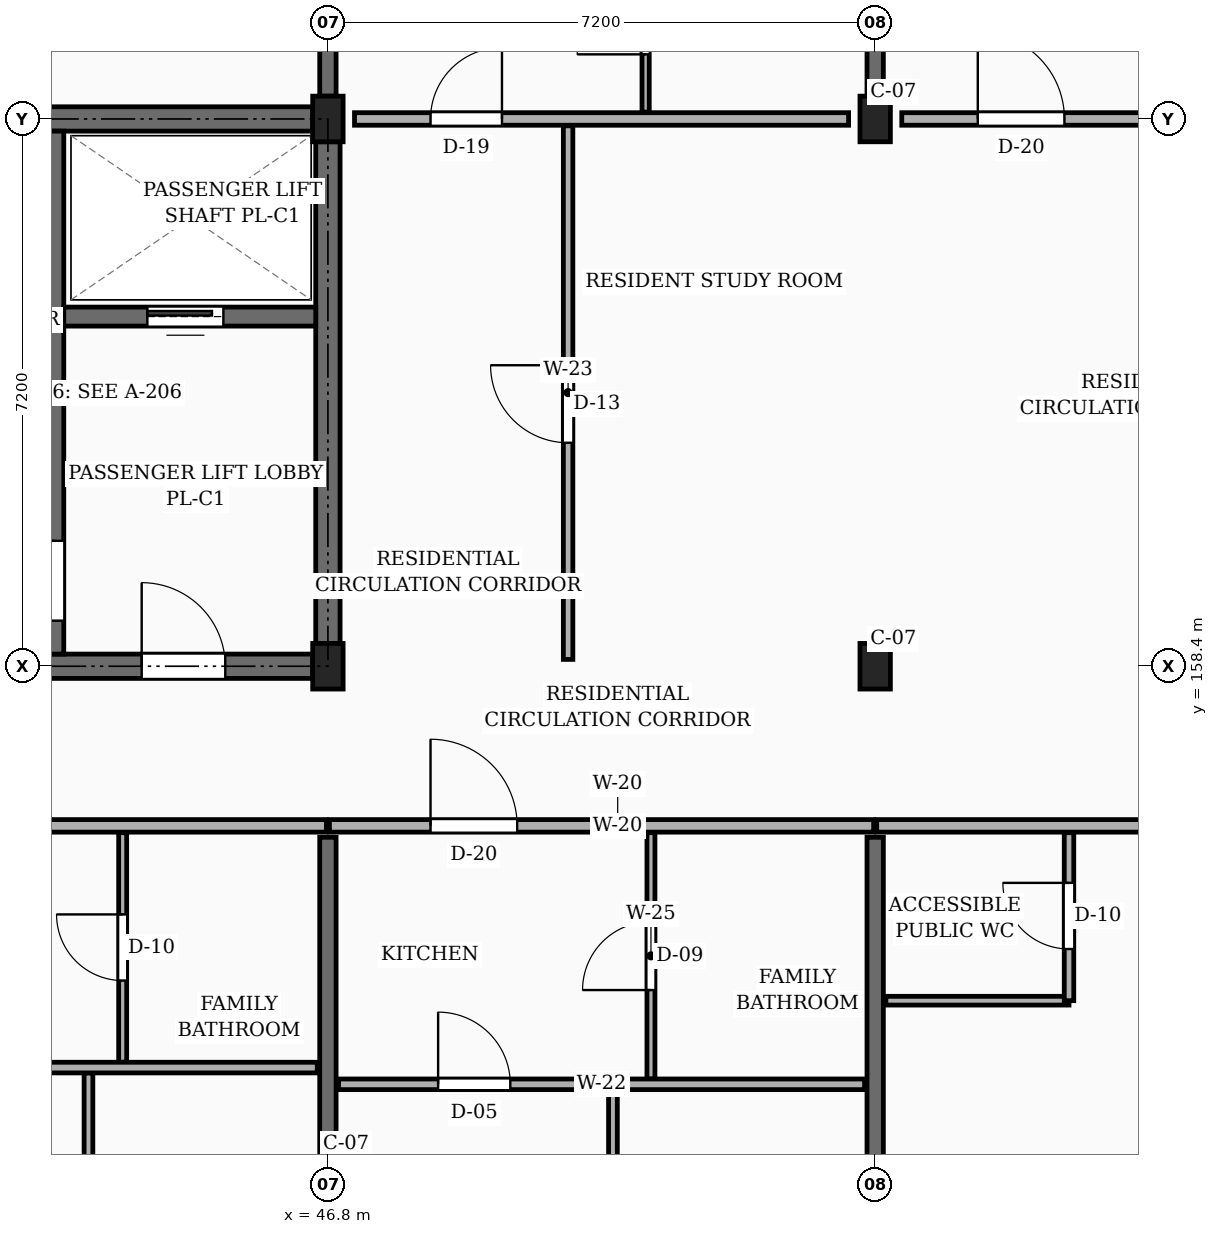
"""IFC4 building model, lengths in metres.
Left out: names, types, materials, properties, quantities, classifications, styles, units other than length and angle.
Written with IfcOpenShell. Run it as: python <this file> out.ifc"""

import sys

from ifc_helpers import new_model, si_unit, direction, frame, frame_2d, origin, origin_2d, place, context, subcontext, project, spatial, rectangle, extrude, element, fill, save


model = new_model("IFC4")
c1 = context("Model", 3, precision=1e-05, world=origin(), true_north=direction((0.0, 1.0)))
c2 = subcontext(c1, "Body", "Model", "MODEL_VIEW")
j1 = project(units=[si_unit("LENGTHUNIT", "METRE"), si_unit("PLANEANGLEUNIT", "RADIAN")], contexts=[c1])
p1 = place(None, origin())
s1 = spatial("IfcSite", under=j1, at=p1, CompositionType="ELEMENT")
p2 = place(p1, origin())
s2 = spatial("IfcBuilding", under=s1, at=p2, CompositionType="ELEMENT")
p3 = place(p2, frame((0.0, 0.0, 26.55)))
s3 = spatial("IfcBuildingStorey", under=s2, at=p3, CompositionType="ELEMENT", Elevation=26.55)
for number, where, z_axis, x_axis in (
    (1, (46.8, 158.4, 0.0), (0.0, 0.0, 1.0), (1.0, 0.0, 0.0)),
    (2, (46.8, 165.6, 0.0), (0.0, 0.0, 1.0), (1.0, 0.0, 0.0)),
    (3, (54.0, 158.4, 0.0), (0.0, 0.0, 1.0), (1.0, 0.0, 0.0)),
    (4, (54.0, 165.6, 0.0), (0.0, 0.0, 1.0), (1.0, 0.0, 0.0)),
):
    element("IfcColumn", number, at=place(p3, frame(where, z_axis=z_axis, x_axis=x_axis)), inside=s3, PredefinedType="COLUMN", context=c2, shape_type="SweptSolid", body=[
        extrude(rectangle(XDim=0.4, YDim=0.6, at=origin_2d()), origin(), (0.0, 0.0, 1.0), 3.15),
    ])
p4 = place(p3, frame((46.8, 144.25, 0.0), z_axis=(0.0, 0.0, 1.0), x_axis=(0.0, 1.0, 0.0)))
e5 = element("IfcWall", 5, at=p4, inside=s3, PredefinedType="SOLIDWALL", context=c2, shape_type="SweptSolid", body=[
    extrude(rectangle(XDim=11.9, YDim=0.215, at=frame_2d((5.95, 0.0))), origin(), (0.0, 0.0, 1.0), 2.185),
])
p5 = place(p3, frame((46.8, 165.9, 0.0), z_axis=(0.0, 0.0, 1.0), x_axis=(0.0, 1.0, 0.0)))
e6 = element("IfcWall", 6, at=p5, inside=s3, PredefinedType="SOLIDWALL", context=c2, shape_type="SweptSolid", body=[
    extrude(rectangle(XDim=6.65, YDim=0.215, at=frame_2d((3.325, 0.0))), origin(), (0.0, 0.0, 1.0), 2.185),
])
p6 = place(p3, frame((54.0, 144.25, 0.0), z_axis=(0.0, 0.0, 1.0), x_axis=(0.0, 1.0, 0.0)))
e7 = element("IfcWall", 7, at=p6, inside=s3, PredefinedType="SOLIDWALL", context=c2, shape_type="SweptSolid", body=[
    extrude(rectangle(XDim=11.9, YDim=0.215, at=frame_2d((5.95, 0.0))), origin(), (0.0, 0.0, 1.0), 2.185),
])
p7 = place(p3, frame((54.0, 165.9, 0.0), z_axis=(0.0, 0.0, 1.0), x_axis=(0.0, 1.0, 0.0)))
e8 = element("IfcWall", 8, at=p7, inside=s3, PredefinedType="SOLIDWALL", context=c2, shape_type="SweptSolid", body=[
    extrude(rectangle(XDim=6.65, YDim=0.215, at=frame_2d((3.325, 0.0))), origin(), (0.0, 0.0, 1.0), 2.185),
])
p8 = place(p3, frame((39.8, 165.6, 0.0), z_axis=(0.0, 0.0, 1.0), x_axis=(1.0, 0.0, 0.0)))
e9 = element("IfcWall", 9, at=p8, inside=s3, PredefinedType="SHEAR", context=c2, shape_type="SweptSolid", body=[
    extrude(rectangle(XDim=6.8, YDim=0.32, at=frame_2d((3.4, 0.0))), origin(), (0.0, 0.0, 1.0), 2.885),
])
p9 = place(p3, frame((46.8, 158.7, 0.0), z_axis=(0.0, 0.0, 1.0), x_axis=(0.0, 1.0, 0.0)))
e10 = element("IfcWall", 10, at=p9, inside=s3, PredefinedType="SHEAR", context=c2, shape_type="SweptSolid", body=[
    extrude(rectangle(XDim=6.6, YDim=0.32, at=frame_2d((3.3, 0.0))), origin(), (0.0, 0.0, 1.0), 2.885),
])
p10 = place(p3, frame((39.8, 158.4, 0.0), z_axis=(0.0, 0.0, 1.0), x_axis=(1.0, 0.0, 0.0)))
e11 = element("IfcWall", 11, at=p10, inside=s3, PredefinedType="SHEAR", context=c2, shape_type="SweptSolid", body=[
    extrude(rectangle(XDim=6.8, YDim=0.32, at=frame_2d((3.4, 0.0))), origin(), (0.0, 0.0, 1.0), 2.885),
])
p11 = place(p10, frame((4.55, 0.0, 0.0)))
e12 = element("IfcOpeningElement", 12, at=p11, cuts=e11, PredefinedType="OPENING", context=c2, shape_type="SweptSolid", body=[
    extrude(rectangle(XDim=1.1, YDim=2.15, at=frame_2d((0.55, 1.075))), frame((0.0, 0.17, 0.0), z_axis=(0.0, -1.0, 0.0), x_axis=(1.0, 0.0, 0.0)), (0.0, 0.0, 1.0), 0.34),
])
p12 = place(p3, frame((43.2, 158.56, 0.0), z_axis=(0.0, 0.0, 1.0), x_axis=(0.0, 1.0, 0.0)))
e13 = element("IfcWall", 13, at=p12, inside=s3, PredefinedType="SHEAR", context=c2, shape_type="SweptSolid", body=[
    extrude(rectangle(XDim=6.88, YDim=0.25, at=frame_2d((3.44, 0.0))), origin(), (0.0, 0.0, 1.0), 2.885),
])
p13 = place(p12, frame((0.44, 0.0, 0.0)))
e14 = element("IfcOpeningElement", 14, at=p13, cuts=e13, PredefinedType="OPENING", context=c2, shape_type="SweptSolid", body=[
    extrude(rectangle(XDim=1.05, YDim=2.15, at=frame_2d((0.525, 1.075))), frame((0.0, 0.135, 0.0), z_axis=(0.0, -1.0, 0.0), x_axis=(1.0, 0.0, 0.0)), (0.0, 0.0, 1.0), 0.27),
])
p14 = place(p3, frame((43.325, 163.0, 0.0), z_axis=(0.0, 0.0, 1.0), x_axis=(1.0, 0.0, 0.0)))
e15 = element("IfcWall", 15, at=p14, inside=s3, PredefinedType="SHEAR", context=c2, shape_type="SweptSolid", body=[
    extrude(rectangle(XDim=3.315, YDim=0.25, at=frame_2d((1.657, 0.0))), origin(), (0.0, 0.0, 1.0), 2.885),
])
p15 = place(p14, frame((1.1, 0.0, 0.0)))
e16 = element("IfcOpeningElement", 16, at=p15, cuts=e15, PredefinedType="OPENING", context=c2, shape_type="SweptSolid", body=[
    extrude(rectangle(XDim=1.0, YDim=2.2, at=frame_2d((0.5, 1.1))), frame((0.0, 0.135, 0.0), z_axis=(0.0, -1.0, 0.0), x_axis=(1.0, 0.0, 0.0)), (0.0, 0.0, 1.0), 0.27),
])
p16 = place(p3, frame((39.62, 156.3, 0.0), z_axis=(0.0, 0.0, 1.0), x_axis=(1.0, 0.0, 0.0)))
e17 = element("IfcWall", 17, at=p16, inside=s3, PredefinedType="PARTITIONING", context=c2, shape_type="SweptSolid", body=[
    extrude(rectangle(XDim=7.16, YDim=0.165, at=frame_2d((3.58, 0.0))), origin(), (0.0, 0.0, 1.0), 2.32),
])
p17 = place(p16, frame((1.33, 0.0, 0.0)))
e18 = element("IfcOpeningElement", 18, at=p17, cuts=e17, PredefinedType="OPENING", context=c2, shape_type="SweptSolid", body=[
    extrude(rectangle(XDim=0.94, YDim=2.12, at=frame_2d((0.47, 1.06))), frame((0.0, 0.093, 0.0), z_axis=(0.0, -1.0, 0.0), x_axis=(1.0, 0.0, 0.0)), (0.0, 0.0, 1.0), 0.185),
])
p18 = place(p3, frame((46.82, 156.3, 0.0), z_axis=(0.0, 0.0, 1.0), x_axis=(1.0, 0.0, 0.0)))
e19 = element("IfcWall", 19, at=p18, inside=s3, PredefinedType="PARTITIONING", context=c2, shape_type="SweptSolid", body=[
    extrude(rectangle(XDim=7.16, YDim=0.165, at=frame_2d((3.58, 0.0))), origin(), (0.0, 0.0, 1.0), 2.32),
])
p19 = place(p18, frame((1.33, 0.0, 0.0)))
e20 = element("IfcOpeningElement", 20, at=p19, cuts=e19, PredefinedType="OPENING", context=c2, shape_type="SweptSolid", body=[
    extrude(rectangle(XDim=1.14, YDim=2.18, at=frame_2d((0.57, 1.09))), frame((0.0, 0.093, 0.0), z_axis=(0.0, -1.0, 0.0), x_axis=(1.0, 0.0, 0.0)), (0.0, 0.0, 1.0), 0.185),
])
p20 = place(p3, frame((54.02, 156.3, 0.0), z_axis=(0.0, 0.0, 1.0), x_axis=(1.0, 0.0, 0.0)))
e21 = element("IfcWall", 21, at=p20, inside=s3, PredefinedType="PARTITIONING", context=c2, shape_type="SweptSolid", body=[
    extrude(rectangle(XDim=7.005, YDim=0.165, at=frame_2d((3.502, 0.0))), origin(), (0.0, 0.0, 1.0), 2.32),
])
p21 = place(p20, frame((4.33, 0.0, 0.0)))
e22 = element("IfcOpeningElement", 22, at=p21, cuts=e21, PredefinedType="OPENING", context=c2, shape_type="SweptSolid", body=[
    extrude(rectangle(XDim=1.1, YDim=2.15, at=frame_2d((0.55, 1.075))), frame((0.0, 0.093, 0.0), z_axis=(0.0, -1.0, 0.0), x_axis=(1.0, 0.0, 0.0)), (0.0, 0.0, 1.0), 0.185),
])
p22 = place(p3, frame((47.15, 165.6, 0.0), z_axis=(0.0, 0.0, 1.0), x_axis=(1.0, 0.0, 0.0)))
e23 = element("IfcWall", 23, at=p22, inside=s3, PredefinedType="PARTITIONING", context=c2, shape_type="SweptSolid", body=[
    extrude(rectangle(XDim=6.5, YDim=0.165, at=frame_2d((3.25, 0.0))), origin(), (0.0, 0.0, 1.0), 2.32),
])
p23 = place(p22, frame((1.0, 0.0, 0.0)))
e24 = element("IfcOpeningElement", 24, at=p23, cuts=e23, PredefinedType="OPENING", context=c2, shape_type="SweptSolid", body=[
    extrude(rectangle(XDim=0.94, YDim=2.12, at=frame_2d((0.47, 1.06))), frame((0.0, 0.093, 0.0), z_axis=(0.0, -1.0, 0.0), x_axis=(1.0, 0.0, 0.0)), (0.0, 0.0, 1.0), 0.185),
])
p24 = place(p3, frame((54.35, 165.6, 0.0), z_axis=(0.0, 0.0, 1.0), x_axis=(1.0, 0.0, 0.0)))
e25 = element("IfcWall", 25, at=p24, inside=s3, PredefinedType="PARTITIONING", context=c2, shape_type="SweptSolid", body=[
    extrude(rectangle(XDim=6.5, YDim=0.165, at=frame_2d((3.25, 0.0))), origin(), (0.0, 0.0, 1.0), 2.32),
])
p25 = place(p24, frame((1.0, 0.0, 0.0)))
e26 = element("IfcOpeningElement", 26, at=p25, cuts=e25, PredefinedType="OPENING", context=c2, shape_type="SweptSolid", body=[
    extrude(rectangle(XDim=1.14, YDim=2.18, at=frame_2d((0.57, 1.09))), frame((0.0, 0.093, 0.0), z_axis=(0.0, -1.0, 0.0), x_axis=(1.0, 0.0, 0.0)), (0.0, 0.0, 1.0), 0.185),
])
p26 = place(p3, frame((43.65, 144.175, 0.0), z_axis=(0.0, 0.0, 1.0), x_axis=(0.0, 1.0, 0.0)))
e27 = element("IfcWall", 27, at=p26, inside=s3, PredefinedType="PARTITIONING", context=c2, shape_type="SweptSolid", body=[
    extrude(rectangle(XDim=8.875, YDim=0.115, at=frame_2d((4.438, 0.0))), origin(), (0.0, 0.0, 1.0), 2.32),
])
p27 = place(p26, frame((3.998, 0.0, 0.0)))
e28 = element("IfcOpeningElement", 28, at=p27, cuts=e27, PredefinedType="OPENING", context=c2, shape_type="SweptSolid", body=[
    extrude(rectangle(XDim=0.88, YDim=2.08, at=frame_2d((0.44, 1.04))), frame((0.0, 0.067, 0.0), z_axis=(0.0, -1.0, 0.0), x_axis=(1.0, 0.0, 0.0)), (0.0, 0.0, 1.0), 0.135),
])
p28 = place(p3, frame((44.1, 153.19, 0.0), z_axis=(0.0, 0.0, 1.0), x_axis=(0.0, 1.0, 0.0)))
e29 = element("IfcWall", 29, at=p28, inside=s3, PredefinedType="PARTITIONING", context=c2, shape_type="SweptSolid", body=[
    extrude(rectangle(XDim=3.02, YDim=0.105, at=frame_2d((1.51, 0.0))), origin(), (0.0, 0.0, 1.0), 2.32),
])
p29 = place(p28, frame((1.075, 0.0, 0.0)))
e30 = element("IfcOpeningElement", 30, at=p29, cuts=e29, PredefinedType="OPENING", context=c2, shape_type="SweptSolid", body=[
    extrude(rectangle(XDim=0.87, YDim=2.05, at=frame_2d((0.435, 1.025))), frame((0.0, 0.062, 0.0), z_axis=(0.0, -1.0, 0.0), x_axis=(1.0, 0.0, 0.0)), (0.0, 0.0, 1.0), 0.125),
])
p30 = place(p3, frame((39.74, 153.12, 0.0), z_axis=(0.0, 0.0, 1.0), x_axis=(1.0, 0.0, 0.0)))
e31 = element("IfcWall", 31, at=p30, inside=s3, PredefinedType="PARTITIONING", context=c2, shape_type="SweptSolid", body=[
    extrude(rectangle(XDim=6.92, YDim=0.14, at=frame_2d((3.46, 0.0))), origin(), (0.0, 0.0, 1.0), 2.32),
])
p31 = place(p30, frame((1.31, 0.0, 0.0)))
e32 = element("IfcOpeningElement", 32, at=p31, cuts=e31, PredefinedType="OPENING", context=c2, shape_type="SweptSolid", body=[
    extrude(rectangle(XDim=0.92, YDim=2.1, at=frame_2d((0.46, 1.05))), frame((0.0, 0.08, 0.0), z_axis=(0.0, -1.0, 0.0), x_axis=(1.0, 0.0, 0.0)), (0.0, 0.0, 1.0), 0.16),
])
p32 = place(p3, frame((49.96, 158.49, 0.0), z_axis=(0.0, 0.0, 1.0), x_axis=(0.0, 1.0, 0.0)))
e33 = element("IfcWall", 33, at=p32, inside=s3, PredefinedType="PARTITIONING", context=c2, shape_type="SweptSolid", body=[
    extrude(rectangle(XDim=7.02, YDim=0.125, at=frame_2d((3.51, 0.0))), origin(), (0.0, 0.0, 1.0), 2.32),
])
p33 = place(p32, frame((2.85, 0.0, 0.0)))
e34 = element("IfcOpeningElement", 34, at=p33, cuts=e33, PredefinedType="OPENING", context=c2, shape_type="SweptSolid", body=[
    extrude(rectangle(XDim=1.02, YDim=2.15, at=frame_2d((0.51, 1.075))), frame((0.0, 0.073, 0.0), z_axis=(0.0, -1.0, 0.0), x_axis=(1.0, 0.0, 0.0)), (0.0, 0.0, 1.0), 0.145),
])
p34 = place(p3, frame((50.55, 144.175, 0.0), z_axis=(0.0, 0.0, 1.0), x_axis=(0.0, 1.0, 0.0)))
e35 = element("IfcWall", 35, at=p34, inside=s3, PredefinedType="PARTITIONING", context=c2, shape_type="SweptSolid", body=[
    extrude(rectangle(XDim=8.655, YDim=0.115, at=frame_2d((4.328, 0.0))), origin(), (0.0, 0.0, 1.0), 2.32),
])
p35 = place(p34, frame((3.877, 0.0, 0.0)))
e36 = element("IfcOpeningElement", 36, at=p35, cuts=e35, PredefinedType="OPENING", context=c2, shape_type="SweptSolid", body=[
    extrude(rectangle(XDim=0.9, YDim=2.1, at=frame_2d((0.45, 1.05))), frame((0.0, 0.067, 0.0), z_axis=(0.0, -1.0, 0.0), x_axis=(1.0, 0.0, 0.0)), (0.0, 0.0, 1.0), 0.135),
])
p36 = place(p3, frame((51.05, 152.97, 0.0), z_axis=(0.0, 0.0, 1.0), x_axis=(0.0, 1.0, 0.0)))
e37 = element("IfcWall", 37, at=p36, inside=s3, PredefinedType="PARTITIONING", context=c2, shape_type="SweptSolid", body=[
    extrude(rectangle(XDim=3.24, YDim=0.105, at=frame_2d((1.62, 0.0))), origin(), (0.0, 0.0, 1.0), 2.32),
])
p37 = place(p36, frame((1.17, 0.0, 0.0)))
e38 = element("IfcOpeningElement", 38, at=p37, cuts=e37, PredefinedType="OPENING", context=c2, shape_type="SweptSolid", body=[
    extrude(rectangle(XDim=0.9, YDim=2.05, at=frame_2d((0.45, 1.025))), frame((0.0, 0.062, 0.0), z_axis=(0.0, -1.0, 0.0), x_axis=(1.0, 0.0, 0.0)), (0.0, 0.0, 1.0), 0.125),
])
p38 = place(p3, frame((46.94, 152.9, 0.0), z_axis=(0.0, 0.0, 1.0), x_axis=(1.0, 0.0, 0.0)))
e39 = element("IfcWall", 39, at=p38, inside=s3, PredefinedType="PARTITIONING", context=c2, shape_type="SweptSolid", body=[
    extrude(rectangle(XDim=6.92, YDim=0.14, at=frame_2d((3.46, 0.0))), origin(), (0.0, 0.0, 1.0), 2.32),
])
p39 = place(p38, frame((1.31, 0.0, 0.0)))
e40 = element("IfcOpeningElement", 40, at=p39, cuts=e39, PredefinedType="OPENING", context=c2, shape_type="SweptSolid", body=[
    extrude(rectangle(XDim=0.95, YDim=2.1, at=frame_2d((0.475, 1.05))), frame((0.0, 0.08, 0.0), z_axis=(0.0, -1.0, 0.0), x_axis=(1.0, 0.0, 0.0)), (0.0, 0.0, 1.0), 0.16),
])
p40 = place(p3, frame((50.98, 165.69, 0.0), z_axis=(0.0, 0.0, 1.0), x_axis=(0.0, 1.0, 0.0)))
e41 = element("IfcWall", 41, at=p40, inside=s3, PredefinedType="PARTITIONING", context=c2, shape_type="SweptSolid", body=[
    extrude(rectangle(XDim=2.42, YDim=0.095, at=frame_2d((1.21, 0.0))), origin(), (0.0, 0.0, 1.0), 2.32),
])
p41 = place(p40, frame((0.76, 0.0, 0.0)))
e42 = element("IfcOpeningElement", 42, at=p41, cuts=e41, PredefinedType="OPENING", context=c2, shape_type="SweptSolid", body=[
    extrude(rectangle(XDim=0.9, YDim=2.05, at=frame_2d((0.45, 1.025))), frame((0.0, 0.058, 0.0), z_axis=(0.0, -1.0, 0.0), x_axis=(1.0, 0.0, 0.0)), (0.0, 0.0, 1.0), 0.115),
])
p42 = place(p3, frame((54.14, 154.0, 0.0), z_axis=(0.0, 0.0, 1.0), x_axis=(1.0, 0.0, 0.0)))
e43 = element("IfcWall", 43, at=p42, inside=s3, PredefinedType="PARTITIONING", context=c2, shape_type="SweptSolid", body=[
    extrude(rectangle(XDim=2.41, YDim=0.115, at=frame_2d((1.205, 0.0))), origin(), (0.0, 0.0, 1.0), 2.32),
])
p43 = place(p3, frame((56.55, 154.0, 0.0), z_axis=(0.0, 0.0, 1.0), x_axis=(0.0, 1.0, 0.0)))
e44 = element("IfcWall", 44, at=p43, inside=s3, PredefinedType="PARTITIONING", context=c2, shape_type="SweptSolid", body=[
    extrude(rectangle(XDim=2.21, YDim=0.125, at=frame_2d((1.105, 0.0))), origin(), (0.0, 0.0, 1.0), 2.32),
])
p44 = place(p43, frame((0.68, 0.0, 0.0)))
e45 = element("IfcOpeningElement", 45, at=p44, cuts=e44, PredefinedType="OPENING", context=c2, shape_type="SweptSolid", body=[
    extrude(rectangle(XDim=0.87, YDim=2.05, at=frame_2d((0.435, 1.025))), frame((0.0, 0.073, 0.0), z_axis=(0.0, -1.0, 0.0), x_axis=(1.0, 0.0, 0.0)), (0.0, 0.0, 1.0), 0.145),
])
p45 = place(p11, frame((1.1, 0.0, 0.0), z_axis=(0.0, 0.0, 1.0), x_axis=(-1.0, 0.0, 0.0)))
e46 = element("IfcDoor", 46, at=p45, inside=s3, OperationType="SINGLE_SWING_LEFT", PredefinedType="DOOR", context=c2, shape_type="SweptSolid", body=[
    extrude(rectangle(XDim=1.1, YDim=2.15, at=frame_2d((0.55, 1.075))), frame((0.0, 0.025, 0.0), z_axis=(0.0, -1.0, 0.0), x_axis=(1.0, 0.0, 0.0)), (0.0, 0.0, 1.0), 0.05),
])
fill(e12, e46)
p46 = place(p13, origin())
e47 = element("IfcDoor", 47, at=p46, inside=s3, OperationType="SINGLE_SWING_RIGHT", PredefinedType="DOOR", context=c2, shape_type="SweptSolid", body=[
    extrude(rectangle(XDim=1.05, YDim=2.15, at=frame_2d((0.525, 1.075))), frame((0.0, 0.025, 0.0), z_axis=(0.0, -1.0, 0.0), x_axis=(1.0, 0.0, 0.0)), (0.0, 0.0, 1.0), 0.05),
])
fill(e14, e47)
p47 = place(p15, origin())
e48 = element("IfcDoor", 48, at=p47, inside=s3, OperationType="SLIDING_TO_LEFT", PredefinedType="DOOR", context=c2, shape_type="SweptSolid", body=[
    extrude(rectangle(XDim=1.0, YDim=2.2, at=frame_2d((0.5, 1.1))), frame((0.0, 0.025, 0.0), z_axis=(0.0, -1.0, 0.0), x_axis=(1.0, 0.0, 0.0)), (0.0, 0.0, 1.0), 0.05),
])
fill(e16, e48)
p48 = place(p19, origin())
e49 = element("IfcDoor", 49, at=p48, inside=s3, OperationType="SINGLE_SWING_LEFT", PredefinedType="DOOR", context=c2, shape_type="SweptSolid", body=[
    extrude(rectangle(XDim=1.14, YDim=2.18, at=frame_2d((0.57, 1.09))), frame((0.0, 0.025, 0.0), z_axis=(0.0, -1.0, 0.0), x_axis=(1.0, 0.0, 0.0)), (0.0, 0.0, 1.0), 0.05),
])
fill(e20, e49)
p49 = place(p23, origin())
e50 = element("IfcDoor", 50, at=p49, inside=s3, OperationType="SINGLE_SWING_RIGHT", PredefinedType="DOOR", context=c2, shape_type="SweptSolid", body=[
    extrude(rectangle(XDim=0.94, YDim=2.12, at=frame_2d((0.47, 1.06))), frame((0.0, 0.025, 0.0), z_axis=(0.0, -1.0, 0.0), x_axis=(1.0, 0.0, 0.0)), (0.0, 0.0, 1.0), 0.05),
])
fill(e24, e50)
p50 = place(p25, origin())
e51 = element("IfcDoor", 51, at=p50, inside=s3, OperationType="SINGLE_SWING_LEFT", PredefinedType="DOOR", context=c2, shape_type="SweptSolid", body=[
    extrude(rectangle(XDim=1.14, YDim=2.18, at=frame_2d((0.57, 1.09))), frame((0.0, 0.025, 0.0), z_axis=(0.0, -1.0, 0.0), x_axis=(1.0, 0.0, 0.0)), (0.0, 0.0, 1.0), 0.05),
])
fill(e26, e51)
p51 = place(p29, origin())
e52 = element("IfcDoor", 52, at=p51, inside=s3, OperationType="SINGLE_SWING_RIGHT", PredefinedType="DOOR", context=c2, shape_type="SweptSolid", body=[
    extrude(rectangle(XDim=0.87, YDim=2.05, at=frame_2d((0.435, 1.025))), frame((0.0, 0.025, 0.0), z_axis=(0.0, -1.0, 0.0), x_axis=(1.0, 0.0, 0.0)), (0.0, 0.0, 1.0), 0.05),
])
fill(e30, e52)
p52 = place(p33, origin())
e53 = element("IfcDoor", 53, at=p52, inside=s3, OperationType="SINGLE_SWING_RIGHT", PredefinedType="DOOR", context=c2, shape_type="SweptSolid", body=[
    extrude(rectangle(XDim=1.02, YDim=2.15, at=frame_2d((0.51, 1.075))), frame((0.0, 0.025, 0.0), z_axis=(0.0, -1.0, 0.0), x_axis=(1.0, 0.0, 0.0)), (0.0, 0.0, 1.0), 0.05),
])
fill(e34, e53)
p53 = place(p37, origin())
e54 = element("IfcDoor", 54, at=p53, inside=s3, OperationType="SINGLE_SWING_LEFT", PredefinedType="DOOR", context=c2, shape_type="SweptSolid", body=[
    extrude(rectangle(XDim=0.9, YDim=2.05, at=frame_2d((0.45, 1.025))), frame((0.0, 0.025, 0.0), z_axis=(0.0, -1.0, 0.0), x_axis=(1.0, 0.0, 0.0)), (0.0, 0.0, 1.0), 0.05),
])
fill(e38, e54)
p54 = place(p39, origin())
e55 = element("IfcDoor", 55, at=p54, inside=s3, OperationType="SINGLE_SWING_LEFT", PredefinedType="DOOR", context=c2, shape_type="SweptSolid", body=[
    extrude(rectangle(XDim=0.95, YDim=2.1, at=frame_2d((0.475, 1.05))), frame((0.0, 0.025, 0.0), z_axis=(0.0, -1.0, 0.0), x_axis=(1.0, 0.0, 0.0)), (0.0, 0.0, 1.0), 0.05),
])
fill(e40, e55)
p55 = place(p41, origin())
e56 = element("IfcDoor", 56, at=p55, inside=s3, OperationType="SINGLE_SWING_LEFT", PredefinedType="DOOR", context=c2, shape_type="SweptSolid", body=[
    extrude(rectangle(XDim=0.9, YDim=2.05, at=frame_2d((0.45, 1.025))), frame((0.0, 0.025, 0.0), z_axis=(0.0, -1.0, 0.0), x_axis=(1.0, 0.0, 0.0)), (0.0, 0.0, 1.0), 0.05),
])
fill(e42, e56)
p56 = place(p44, origin())
e57 = element("IfcDoor", 57, at=p56, inside=s3, OperationType="SINGLE_SWING_RIGHT", PredefinedType="DOOR", context=c2, shape_type="SweptSolid", body=[
    extrude(rectangle(XDim=0.87, YDim=2.05, at=frame_2d((0.435, 1.025))), frame((0.0, 0.025, 0.0), z_axis=(0.0, -1.0, 0.0), x_axis=(1.0, 0.0, 0.0)), (0.0, 0.0, 1.0), 0.05),
])
fill(e45, e57)
save(model, sys.argv[1])
